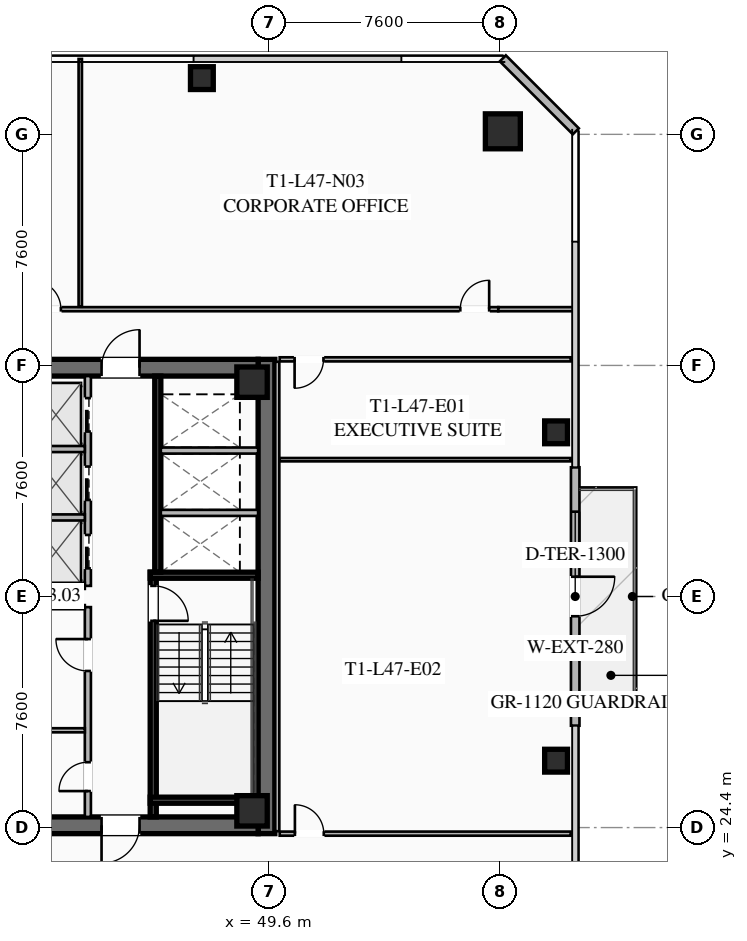
"""IFC4 building model, lengths in metres.
Left out: names, types, materials, properties, quantities, classifications, styles, units other than length and angle.
Written with IfcOpenShell. Run it as: python <this file> out.ifc"""

import sys

from ifc_helpers import new_model, si_unit, direction, frame, frame_2d, origin, origin_2d, place, context, subcontext, project, spatial, rectangle, hollow_rectangle, extrude, element, fill, save


model = new_model("IFC4")
c1 = context("Model", 3, precision=1e-05, world=origin(), true_north=direction((0.0, 1.0)))
c2 = subcontext(c1, "Body", "Model", "MODEL_VIEW")
j1 = project(units=[si_unit("LENGTHUNIT", "METRE"), si_unit("PLANEANGLEUNIT", "RADIAN")], contexts=[c1])
p1 = place(None, origin())
s1 = spatial("IfcSite", under=j1, at=p1, CompositionType="ELEMENT")
p2 = place(p1, origin())
s2 = spatial("IfcBuilding", under=s1, at=p2, CompositionType="ELEMENT")
p3 = place(p2, frame((0.0, 0.0, 174.75)))
s3 = spatial("IfcBuildingStorey", under=s2, at=p3, CompositionType="ELEMENT", Elevation=174.75)
p4 = place(p3, frame((49.525, 39.8, 0.0), z_axis=(0.0, 0.0, 1.0), x_axis=(0.0, -1.0, 0.0)))
e1 = element("IfcWall", 1, at=p4, inside=s3, PredefinedType="SHEAR", context=c2, shape_type="SweptSolid", body=[
    extrude(rectangle(XDim=15.6, YDim=0.55, at=frame_2d((7.8, 0.0))), origin(), (0.0, 0.0, 1.0), 3.55),
])
p5 = place(p3, frame((49.25, 24.475, 0.0), z_axis=(0.0, 0.0, 1.0), x_axis=(-1.0, 0.0, 0.0)))
e2 = element("IfcWall", 2, at=p5, inside=s3, PredefinedType="SHEAR", context=c2, shape_type="SweptSolid", body=[
    extrude(rectangle(XDim=14.5, YDim=0.55, at=frame_2d((7.25, 0.0))), origin(), (0.0, 0.0, 1.0), 3.55),
])
p6 = place(p5, frame((8.95, 0.0, 0.0)))
e3 = element("IfcOpeningElement", 3, at=p6, cuts=e2, PredefinedType="OPENING", context=c2, shape_type="SweptSolid", body=[
    extrude(rectangle(XDim=1.25, YDim=2.25, at=frame_2d((0.625, 1.125))), frame((0.0, 0.285, 0.0), z_axis=(0.0, -1.0, 0.0), x_axis=(1.0, 0.0, 0.0)), (0.0, 0.0, 1.0), 0.57),
])
p7 = place(p5, frame((3.9, 0.0, 0.0)))
e4 = element("IfcOpeningElement", 4, at=p7, cuts=e2, PredefinedType="OPENING", context=c2, shape_type="SweptSolid", body=[
    extrude(rectangle(XDim=1.25, YDim=2.25, at=frame_2d((0.625, 1.125))), frame((0.0, 0.285, 0.0), z_axis=(0.0, -1.0, 0.0), x_axis=(1.0, 0.0, 0.0)), (0.0, 0.0, 1.0), 0.57),
])
p8 = place(p3, frame((34.75, 39.525, 0.0), z_axis=(0.0, 0.0, 1.0), x_axis=(1.0, 0.0, 0.0)))
e5 = element("IfcWall", 5, at=p8, inside=s3, PredefinedType="SHEAR", context=c2, shape_type="SweptSolid", body=[
    extrude(rectangle(XDim=14.5, YDim=0.55, at=frame_2d((7.25, 0.0))), origin(), (0.0, 0.0, 1.0), 3.55),
])
p9 = place(p8, frame((4.3, 0.0, 0.0)))
e6 = element("IfcOpeningElement", 6, at=p9, cuts=e5, PredefinedType="OPENING", context=c2, shape_type="SweptSolid", body=[
    extrude(rectangle(XDim=1.25, YDim=2.25, at=frame_2d((0.625, 1.125))), frame((0.0, 0.285, 0.0), z_axis=(0.0, -1.0, 0.0), x_axis=(1.0, 0.0, 0.0)), (0.0, 0.0, 1.0), 0.57),
])
p10 = place(p8, frame((9.35, 0.0, 0.0)))
e7 = element("IfcOpeningElement", 7, at=p10, cuts=e5, PredefinedType="OPENING", context=c2, shape_type="SweptSolid", body=[
    extrude(rectangle(XDim=1.25, YDim=2.25, at=frame_2d((0.625, 1.125))), frame((0.0, 0.285, 0.0), z_axis=(0.0, -1.0, 0.0), x_axis=(1.0, 0.0, 0.0)), (0.0, 0.0, 1.0), 0.57),
])
for number, where, z_axis, x_axis in (
    (8, (49.05, 24.95, 0.0), (0.0, 0.0, 1.0), (1.0, 0.0, 0.0)),
    (9, (49.05, 39.05, 0.0), (0.0, 0.0, 1.0), (1.0, 0.0, 0.0)),
):
    element("IfcColumn", number, at=place(p3, frame(where, z_axis=z_axis, x_axis=x_axis)), inside=s3, PredefinedType="COLUMN", context=c2, shape_type="SweptSolid", body=[
        extrude(hollow_rectangle(XDim=1.0, YDim=1.0, WallThickness=0.04, at=origin_2d()), origin(), (0.0, 0.0, 1.0), 3.37),
    ])
p11 = place(p3, frame((57.3, 47.3, 0.0), z_axis=(0.0, 0.0, 1.0), x_axis=(1.0, 0.0, 0.0)))
e10 = element("IfcColumn", 10, at=p11, inside=s3, PredefinedType="COLUMN", context=c2, shape_type="SweptSolid", body=[
    extrude(hollow_rectangle(XDim=1.15, YDim=1.15, WallThickness=0.045, at=origin_2d()), origin(), (0.0, 0.0, 1.0), 3.37),
])
for number, where, z_axis, x_axis in (
    (11, (59.05, 26.6, 0.0), (0.0, 0.0, 1.0), (1.0, 0.0, 0.0)),
    (12, (59.05, 37.4, 0.0), (0.0, 0.0, 1.0), (1.0, 0.0, 0.0)),
    (13, (47.4, 49.05, 0.0), (0.0, 0.0, 1.0), (1.0, 0.0, 0.0)),
):
    element("IfcColumn", number, at=place(p3, frame(where, z_axis=z_axis, x_axis=x_axis)), inside=s3, PredefinedType="COLUMN", context=c2, shape_type="SweptSolid", body=[
        extrude(hollow_rectangle(XDim=0.75, YDim=0.75, WallThickness=0.032, at=origin_2d()), origin(), (0.0, 0.0, 1.0), 3.37),
    ])
p12 = place(p3, frame((59.68, 36.25, 0.0), z_axis=(0.0, 0.0, 1.0), x_axis=(0.0, -1.0, 0.0)))
e14 = element("IfcWall", 14, at=p12, inside=s3, PredefinedType="SOLIDWALL", context=c2, shape_type="SweptSolid", body=[
    extrude(rectangle(XDim=8.5, YDim=0.28, at=frame_2d((4.25, 0.0))), origin(), (0.0, 0.0, 1.0), 3.37),
])
p13 = place(p12, frame((3.6, 0.0, 0.0)))
e15 = element("IfcOpeningElement", 15, at=p13, cuts=e14, PredefinedType="OPENING", context=c2, shape_type="SweptSolid", body=[
    extrude(rectangle(XDim=1.3, YDim=2.15, at=frame_2d((0.65, 1.075))), frame((0.0, 0.15, 0.0), z_axis=(0.0, -1.0, 0.0), x_axis=(1.0, 0.0, 0.0)), (0.0, 0.0, 1.0), 0.3),
])
p14 = place(p12, frame((1.46, 0.0, 0.85)))
e16 = element("IfcOpeningElement", 16, at=p14, cuts=e14, PredefinedType="OPENING", context=c2, shape_type="SweptSolid", body=[
    extrude(rectangle(XDim=1.8, YDim=1.92, at=frame_2d((0.9, 0.96))), frame((0.0, 0.15, 0.0), z_axis=(0.0, -1.0, 0.0), x_axis=(1.0, 0.0, 0.0)), (0.0, 0.0, 1.0), 0.3),
])
p15 = place(p3, frame((57.3, 49.7, 0.0), z_axis=(0.0, 0.0, 1.0), x_axis=(0.707106781187, -0.707106781187, 0.0)))
e17 = element("IfcWall", 17, at=p15, inside=s3, PredefinedType="SOLIDWALL", context=c2, shape_type="SweptSolid", body=[
    extrude(rectangle(XDim=3.394, YDim=0.28, at=frame_2d((1.697, 0.0))), origin(), (0.0, 0.0, 1.0), 3.37),
])
p16 = place(p3, frame((45.8, 32.8, 0.0), z_axis=(0.0, 0.0, 1.0), x_axis=(0.0, -1.0, 0.0)))
e18 = element("IfcWall", 18, at=p16, inside=s3, PredefinedType="SHEAR", context=c2, shape_type="SweptSolid", body=[
    extrude(rectangle(XDim=8.05, YDim=0.2, at=frame_2d((4.025, 0.0))), origin(), (0.0, 0.0, 1.0), 3.37),
])
p17 = place(p16, frame((0.45, 0.0, 0.0)))
e19 = element("IfcOpeningElement", 19, at=p17, cuts=e18, PredefinedType="OPENING", context=c2, shape_type="SweptSolid", body=[
    extrude(rectangle(XDim=1.15, YDim=2.2, at=frame_2d((0.575, 1.1))), frame((0.0, 0.11, 0.0), z_axis=(0.0, -1.0, 0.0), x_axis=(1.0, 0.0, 0.0)), (0.0, 0.0, 1.0), 0.22),
])
for number, where, z_axis, x_axis in (
    (20, (45.7, 32.7, 0.0), (0.0, 0.0, 1.0), (1.0, 0.0, 0.0)),
    (21, (45.7, 25.3, 0.0), (0.0, 0.0, 1.0), (1.0, 0.0, 0.0)),
):
    element("IfcWall", number, at=place(p3, frame(where, z_axis=z_axis, x_axis=x_axis)), inside=s3, PredefinedType="SHEAR", context=c2, shape_type="SweptSolid", body=[
        extrude(rectangle(XDim=3.55, YDim=0.2, at=frame_2d((1.775, 0.0))), origin(), (0.0, 0.0, 1.0), 3.37),
    ])
p18 = place(p3, frame((45.95, 39.25, 0.0), z_axis=(0.0, 0.0, 1.0), x_axis=(0.0, -1.0, 0.0)))
e22 = element("IfcWall", 22, at=p18, inside=s3, PredefinedType="SHEAR", context=c2, shape_type="SweptSolid", body=[
    extrude(rectangle(XDim=6.45, YDim=0.2, at=frame_2d((3.225, 0.0))), origin(), (0.0, 0.0, 1.0), 3.37),
])
for number, where, z_axis, x_axis in (
    (23, (46.05, 34.75, 0.0), (0.0, 0.0, 1.0), (1.0, 0.0, 0.0)),
    (24, (46.05, 36.8, 0.0), (0.0, 0.0, 1.0), (1.0, 0.0, 0.0)),
):
    element("IfcWall", number, at=place(p3, frame(where, z_axis=z_axis, x_axis=x_axis)), inside=s3, PredefinedType="SOLIDWALL", context=c2, shape_type="SweptSolid", body=[
        extrude(rectangle(XDim=3.2, YDim=0.2, at=frame_2d((1.6, 0.0))), origin(), (0.0, 0.0, 1.0), 3.37),
    ])
p19 = place(p3, frame((43.65, 24.75, 0.0), z_axis=(0.0, 0.0, 1.0), x_axis=(0.0, 1.0, 0.0)))
e25 = element("IfcWall", 25, at=p19, inside=s3, PredefinedType="SOLIDWALL", context=c2, shape_type="SweptSolid", body=[
    extrude(rectangle(XDim=6.9, YDim=0.2, at=frame_2d((3.45, 0.0))), origin(), (0.0, 0.0, 1.0), 2.723),
])
p20 = place(p19, frame((0.85, 0.0, 0.0)))
e26 = element("IfcOpeningElement", 26, at=p20, cuts=e25, PredefinedType="OPENING", context=c2, shape_type="SweptSolid", body=[
    extrude(rectangle(XDim=0.95, YDim=2.05, at=frame_2d((0.475, 1.025))), frame((0.0, 0.11, 0.0), z_axis=(0.0, -1.0, 0.0), x_axis=(1.0, 0.0, 0.0)), (0.0, 0.0, 1.0), 0.22),
])
p21 = place(p19, frame((4.8, 0.0, 0.0)))
e27 = element("IfcOpeningElement", 27, at=p21, cuts=e25, PredefinedType="OPENING", context=c2, shape_type="SweptSolid", body=[
    extrude(rectangle(XDim=1.05, YDim=2.2, at=frame_2d((0.525, 1.1))), frame((0.0, 0.11, 0.0), z_axis=(0.0, -1.0, 0.0), x_axis=(1.0, 0.0, 0.0)), (0.0, 0.0, 1.0), 0.22),
])
for number, where, z_axis, x_axis in (
    (28, (41.67, 31.65, 0.0), (0.0, 0.0, 1.0), (1.0, 0.0, 0.0)),
    (29, (41.67, 27.6, 0.0), (0.0, 0.0, 1.0), (1.0, 0.0, 0.0)),
):
    element("IfcWall", number, at=place(p3, frame(where, z_axis=z_axis, x_axis=x_axis)), inside=s3, PredefinedType="PARTITIONING", context=c2, shape_type="SweptSolid", body=[
        extrude(rectangle(XDim=1.88, YDim=0.135, at=frame_2d((0.94, 0.0))), origin(), (0.0, 0.0, 1.0), 2.723),
    ])
p22 = place(p3, frame((43.65, 32.35, 0.0), z_axis=(0.0, 0.0, 1.0), x_axis=(0.0, 1.0, 0.0)))
e30 = element("IfcWall", 30, at=p22, inside=s3, PredefinedType="SOLIDWALL", context=c2, shape_type="SweptSolid", body=[
    extrude(rectangle(XDim=6.9, YDim=0.2, at=frame_2d((3.45, 0.0))), origin(), (0.0, 0.0, 1.0), 3.37),
])
p23 = place(p22, frame((0.575, 0.0, 0.0)))
e31 = element("IfcOpeningElement", 31, at=p23, cuts=e30, PredefinedType="OPENING", context=c2, shape_type="SweptSolid", body=[
    extrude(rectangle(XDim=1.1, YDim=2.2, at=frame_2d((0.55, 1.1))), frame((0.0, 0.11, 0.0), z_axis=(0.0, -1.0, 0.0), x_axis=(1.0, 0.0, 0.0)), (0.0, 0.0, 1.0), 0.22),
])
p24 = place(p22, frame((2.825, 0.0, 0.0)))
e32 = element("IfcOpeningElement", 32, at=p24, cuts=e30, PredefinedType="OPENING", context=c2, shape_type="SweptSolid", body=[
    extrude(rectangle(XDim=1.1, YDim=2.2, at=frame_2d((0.55, 1.1))), frame((0.0, 0.11, 0.0), z_axis=(0.0, -1.0, 0.0), x_axis=(1.0, 0.0, 0.0)), (0.0, 0.0, 1.0), 0.22),
])
p25 = place(p22, frame((5.075, 0.0, 0.0)))
e33 = element("IfcOpeningElement", 33, at=p25, cuts=e30, PredefinedType="OPENING", context=c2, shape_type="SweptSolid", body=[
    extrude(rectangle(XDim=1.1, YDim=2.2, at=frame_2d((0.55, 1.1))), frame((0.0, 0.11, 0.0), z_axis=(0.0, -1.0, 0.0), x_axis=(1.0, 0.0, 0.0)), (0.0, 0.0, 1.0), 0.22),
])
for number, where, z_axis, x_axis in (
    (34, (41.67, 32.35, 0.0), (0.0, 0.0, 1.0), (1.0, 0.0, 0.0)),
    (35, (41.67, 34.6, 0.0), (0.0, 0.0, 1.0), (1.0, 0.0, 0.0)),
    (36, (41.67, 36.85, 0.0), (0.0, 0.0, 1.0), (1.0, 0.0, 0.0)),
):
    element("IfcWall", number, at=place(p3, frame(where, z_axis=z_axis, x_axis=x_axis)), inside=s3, PredefinedType="SOLIDWALL", context=c2, shape_type="SweptSolid", body=[
        extrude(rectangle(XDim=1.88, YDim=0.2, at=frame_2d((0.94, 0.0))), origin(), (0.0, 0.0, 1.0), 3.37),
    ])
p26 = place(p3, frame((26.85, 41.45, 0.0), z_axis=(0.0, 0.0, 1.0), x_axis=(1.0, 0.0, 0.0)))
e37 = element("IfcWall", 37, at=p26, inside=s3, PredefinedType="PARTITIONING", context=c2, shape_type="SweptSolid", body=[
    extrude(rectangle(XDim=30.3, YDim=0.135, at=frame_2d((15.15, 0.0))), origin(), (0.0, 0.0, 1.0), 2.723),
])
p27 = place(p26, frame((0.3, 0.0, 0.0)))
e38 = element("IfcOpeningElement", 38, at=p27, cuts=e37, PredefinedType="OPENING", context=c2, shape_type="SweptSolid", body=[
    extrude(rectangle(XDim=0.95, YDim=2.05, at=frame_2d((0.475, 1.025))), frame((0.0, 0.077, 0.0), z_axis=(0.0, -1.0, 0.0), x_axis=(1.0, 0.0, 0.0)), (0.0, 0.0, 1.0), 0.155),
])
p28 = place(p26, frame((14.963, 0.0, 0.0)))
e39 = element("IfcOpeningElement", 39, at=p28, cuts=e37, PredefinedType="OPENING", context=c2, shape_type="SweptSolid", body=[
    extrude(rectangle(XDim=0.95, YDim=2.05, at=frame_2d((0.475, 1.025))), frame((0.0, 0.077, 0.0), z_axis=(0.0, -1.0, 0.0), x_axis=(1.0, 0.0, 0.0)), (0.0, 0.0, 1.0), 0.155),
])
p29 = place(p26, frame((29.05, 0.0, 0.0)))
e40 = element("IfcOpeningElement", 40, at=p29, cuts=e37, PredefinedType="OPENING", context=c2, shape_type="SweptSolid", body=[
    extrude(rectangle(XDim=0.95, YDim=2.05, at=frame_2d((0.475, 1.025))), frame((0.0, 0.077, 0.0), z_axis=(0.0, -1.0, 0.0), x_axis=(1.0, 0.0, 0.0)), (0.0, 0.0, 1.0), 0.155),
])
p30 = place(p3, frame((57.15, 41.45, 0.0), z_axis=(0.0, 0.0, 1.0), x_axis=(1.0, 0.0, 0.0)))
e41 = element("IfcWall", 41, at=p30, inside=s3, PredefinedType="PARTITIONING", context=c2, shape_type="SweptSolid", body=[
    extrude(rectangle(XDim=2.53, YDim=0.135, at=frame_2d((1.265, 0.0))), origin(), (0.0, 0.0, 1.0), 2.723),
])
p31 = place(p3, frame((43.4, 41.53, 0.0), z_axis=(0.0, 0.0, 1.0), x_axis=(0.0, 1.0, 0.0)))
e42 = element("IfcWall", 42, at=p31, inside=s3, PredefinedType="PARTITIONING", context=c2, shape_type="SweptSolid", body=[
    extrude(rectangle(XDim=8.15, YDim=0.11, at=frame_2d((4.075, 0.0))), origin(), (0.0, 0.0, 1.0), 2.723),
])
p32 = place(p3, frame((49.88, 39.72, 0.0), z_axis=(0.0, 0.0, 1.0), x_axis=(0.0, -1.0, 0.0)))
e43 = element("IfcWall", 43, at=p32, inside=s3, PredefinedType="PARTITIONING", context=c2, shape_type="SweptSolid", body=[
    extrude(rectangle(XDim=15.44, YDim=0.135, at=frame_2d((7.72, 0.0))), origin(), (0.0, 0.0, 1.0), 2.723),
])
p33 = place(p3, frame((59.53, 39.8, 0.0), z_axis=(0.0, 0.0, 1.0), x_axis=(-1.0, 0.0, 0.0)))
e44 = element("IfcWall", 44, at=p33, inside=s3, PredefinedType="PARTITIONING", context=c2, shape_type="SweptSolid", body=[
    extrude(rectangle(XDim=9.57, YDim=0.135, at=frame_2d((4.785, 0.0))), origin(), (0.0, 0.0, 1.0), 2.723),
])
p34 = place(p33, frame((8.13, 0.0, 0.0)))
e45 = element("IfcOpeningElement", 45, at=p34, cuts=e44, PredefinedType="OPENING", context=c2, shape_type="SweptSolid", body=[
    extrude(rectangle(XDim=0.95, YDim=2.05, at=frame_2d((0.475, 1.025))), frame((0.0, 0.077, 0.0), z_axis=(0.0, -1.0, 0.0), x_axis=(1.0, 0.0, 0.0)), (0.0, 0.0, 1.0), 0.155),
])
p35 = place(p3, frame((49.96, 24.2, 0.0), z_axis=(0.0, 0.0, 1.0), x_axis=(1.0, 0.0, 0.0)))
e46 = element("IfcWall", 46, at=p35, inside=s3, PredefinedType="PARTITIONING", context=c2, shape_type="SweptSolid", body=[
    extrude(rectangle(XDim=9.57, YDim=0.135, at=frame_2d((4.785, 0.0))), origin(), (0.0, 0.0, 1.0), 2.723),
])
p36 = place(p35, frame((0.5, 0.0, 0.0)))
e47 = element("IfcOpeningElement", 47, at=p36, cuts=e46, PredefinedType="OPENING", context=c2, shape_type="SweptSolid", body=[
    extrude(rectangle(XDim=0.95, YDim=2.05, at=frame_2d((0.475, 1.025))), frame((0.0, 0.077, 0.0), z_axis=(0.0, -1.0, 0.0), x_axis=(1.0, 0.0, 0.0)), (0.0, 0.0, 1.0), 0.155),
])
p37 = place(p3, frame((49.96, 36.5, 0.0), z_axis=(0.0, 0.0, 1.0), x_axis=(1.0, 0.0, 0.0)))
e48 = element("IfcWall", 48, at=p37, inside=s3, PredefinedType="PARTITIONING", context=c2, shape_type="SweptSolid", body=[
    extrude(rectangle(XDim=9.57, YDim=0.11, at=frame_2d((4.785, 0.0))), origin(), (0.0, 0.0, 1.0), 2.723),
])
p38 = place(p13, origin())
e49 = element("IfcDoor", 49, at=p38, inside=s3, OperationType="SINGLE_SWING_LEFT", PredefinedType="DOOR", context=c2, shape_type="SweptSolid", body=[
    extrude(rectangle(XDim=1.3, YDim=2.15, at=frame_2d((0.65, 1.075))), frame((0.0, 0.025, 0.0), z_axis=(0.0, -1.0, 0.0), x_axis=(1.0, 0.0, 0.0)), (0.0, 0.0, 1.0), 0.05),
])
fill(e15, e49)
p39 = place(p14, origin())
e50 = element("IfcWindow", 50, at=p39, inside=s3, PartitioningType="SINGLE_PANEL", PredefinedType="WINDOW", context=c2, shape_type="SweptSolid", body=[
    extrude(rectangle(XDim=1.8, YDim=1.92, at=frame_2d((0.9, 0.96))), frame((0.0, 0.03, 0.0), z_axis=(0.0, -1.0, 0.0), x_axis=(1.0, 0.0, 0.0)), (0.0, 0.0, 1.0), 0.06),
])
fill(e16, e50)
p40 = place(p10, origin())
e51 = element("IfcDoor", 51, at=p40, inside=s3, OperationType="SINGLE_SWING_RIGHT", PredefinedType="DOOR", context=c2, shape_type="SweptSolid", body=[
    extrude(rectangle(XDim=1.25, YDim=2.25, at=frame_2d((0.625, 1.125))), frame((0.0, 0.025, 0.0), z_axis=(0.0, -1.0, 0.0), x_axis=(1.0, 0.0, 0.0)), (0.0, 0.0, 1.0), 0.05),
])
fill(e7, e51)
p41 = place(p7, origin())
e52 = element("IfcDoor", 52, at=p41, inside=s3, OperationType="SINGLE_SWING_RIGHT", PredefinedType="DOOR", context=c2, shape_type="SweptSolid", body=[
    extrude(rectangle(XDim=1.25, YDim=2.25, at=frame_2d((0.625, 1.125))), frame((0.0, 0.025, 0.0), z_axis=(0.0, -1.0, 0.0), x_axis=(1.0, 0.0, 0.0)), (0.0, 0.0, 1.0), 0.05),
])
fill(e4, e52)
p42 = place(p17, origin())
e53 = element("IfcDoor", 53, at=p42, inside=s3, OperationType="SINGLE_SWING_RIGHT", PredefinedType="DOOR", context=c2, shape_type="SweptSolid", body=[
    extrude(rectangle(XDim=1.15, YDim=2.2, at=frame_2d((0.575, 1.1))), frame((0.0, 0.025, 0.0), z_axis=(0.0, -1.0, 0.0), x_axis=(1.0, 0.0, 0.0)), (0.0, 0.0, 1.0), 0.05),
])
fill(e19, e53)
p43 = place(p20, origin())
e54 = element("IfcDoor", 54, at=p43, inside=s3, OperationType="SINGLE_SWING_LEFT", PredefinedType="DOOR", context=c2, shape_type="SweptSolid", body=[
    extrude(rectangle(XDim=0.95, YDim=2.05, at=frame_2d((0.475, 1.025))), frame((0.0, 0.025, 0.0), z_axis=(0.0, -1.0, 0.0), x_axis=(1.0, 0.0, 0.0)), (0.0, 0.0, 1.0), 0.05),
])
fill(e26, e54)
p44 = place(p21, origin())
e55 = element("IfcDoor", 55, at=p44, inside=s3, OperationType="SINGLE_SWING_RIGHT", PredefinedType="DOOR", context=c2, shape_type="SweptSolid", body=[
    extrude(rectangle(XDim=1.05, YDim=2.2, at=frame_2d((0.525, 1.1))), frame((0.0, 0.025, 0.0), z_axis=(0.0, -1.0, 0.0), x_axis=(1.0, 0.0, 0.0)), (0.0, 0.0, 1.0), 0.05),
])
fill(e27, e55)
p45 = place(p28, origin())
e56 = element("IfcDoor", 56, at=p45, inside=s3, OperationType="SINGLE_SWING_LEFT", PredefinedType="DOOR", context=c2, shape_type="SweptSolid", body=[
    extrude(rectangle(XDim=0.95, YDim=2.05, at=frame_2d((0.475, 1.025))), frame((0.0, 0.025, 0.0), z_axis=(0.0, -1.0, 0.0), x_axis=(1.0, 0.0, 0.0)), (0.0, 0.0, 1.0), 0.05),
])
fill(e39, e56)
p46 = place(p29, origin())
e57 = element("IfcDoor", 57, at=p46, inside=s3, OperationType="SINGLE_SWING_RIGHT", PredefinedType="DOOR", context=c2, shape_type="SweptSolid", body=[
    extrude(rectangle(XDim=0.95, YDim=2.05, at=frame_2d((0.475, 1.025))), frame((0.0, 0.025, 0.0), z_axis=(0.0, -1.0, 0.0), x_axis=(1.0, 0.0, 0.0)), (0.0, 0.0, 1.0), 0.05),
])
fill(e40, e57)
p47 = place(p34, origin())
e58 = element("IfcDoor", 58, at=p47, inside=s3, OperationType="SINGLE_SWING_RIGHT", PredefinedType="DOOR", context=c2, shape_type="SweptSolid", body=[
    extrude(rectangle(XDim=0.95, YDim=2.05, at=frame_2d((0.475, 1.025))), frame((0.0, 0.025, 0.0), z_axis=(0.0, -1.0, 0.0), x_axis=(1.0, 0.0, 0.0)), (0.0, 0.0, 1.0), 0.05),
])
fill(e45, e58)
p48 = place(p36, origin())
e59 = element("IfcDoor", 59, at=p48, inside=s3, OperationType="SINGLE_SWING_LEFT", PredefinedType="DOOR", context=c2, shape_type="SweptSolid", body=[
    extrude(rectangle(XDim=0.95, YDim=2.05, at=frame_2d((0.475, 1.025))), frame((0.0, 0.025, 0.0), z_axis=(0.0, -1.0, 0.0), x_axis=(1.0, 0.0, 0.0)), (0.0, 0.0, 1.0), 0.05),
])
fill(e47, e59)
p49 = place(p23, origin())
e60 = element("IfcDoor", 60, at=p49, inside=s3, OperationType="SLIDING_TO_LEFT", PredefinedType="DOOR", context=c2, shape_type="SweptSolid", body=[
    extrude(rectangle(XDim=1.1, YDim=2.2, at=frame_2d((0.55, 1.1))), frame((0.0, 0.025, 0.0), z_axis=(0.0, -1.0, 0.0), x_axis=(1.0, 0.0, 0.0)), (0.0, 0.0, 1.0), 0.05),
])
fill(e31, e60)
p50 = place(p24, origin())
e61 = element("IfcDoor", 61, at=p50, inside=s3, OperationType="SLIDING_TO_LEFT", PredefinedType="DOOR", context=c2, shape_type="SweptSolid", body=[
    extrude(rectangle(XDim=1.1, YDim=2.2, at=frame_2d((0.55, 1.1))), frame((0.0, 0.025, 0.0), z_axis=(0.0, -1.0, 0.0), x_axis=(1.0, 0.0, 0.0)), (0.0, 0.0, 1.0), 0.05),
])
fill(e32, e61)
p51 = place(p25, origin())
e62 = element("IfcDoor", 62, at=p51, inside=s3, OperationType="SLIDING_TO_LEFT", PredefinedType="DOOR", context=c2, shape_type="SweptSolid", body=[
    extrude(rectangle(XDim=1.1, YDim=2.2, at=frame_2d((0.55, 1.1))), frame((0.0, 0.025, 0.0), z_axis=(0.0, -1.0, 0.0), x_axis=(1.0, 0.0, 0.0)), (0.0, 0.0, 1.0), 0.05),
])
fill(e33, e62)
save(model, sys.argv[1])
